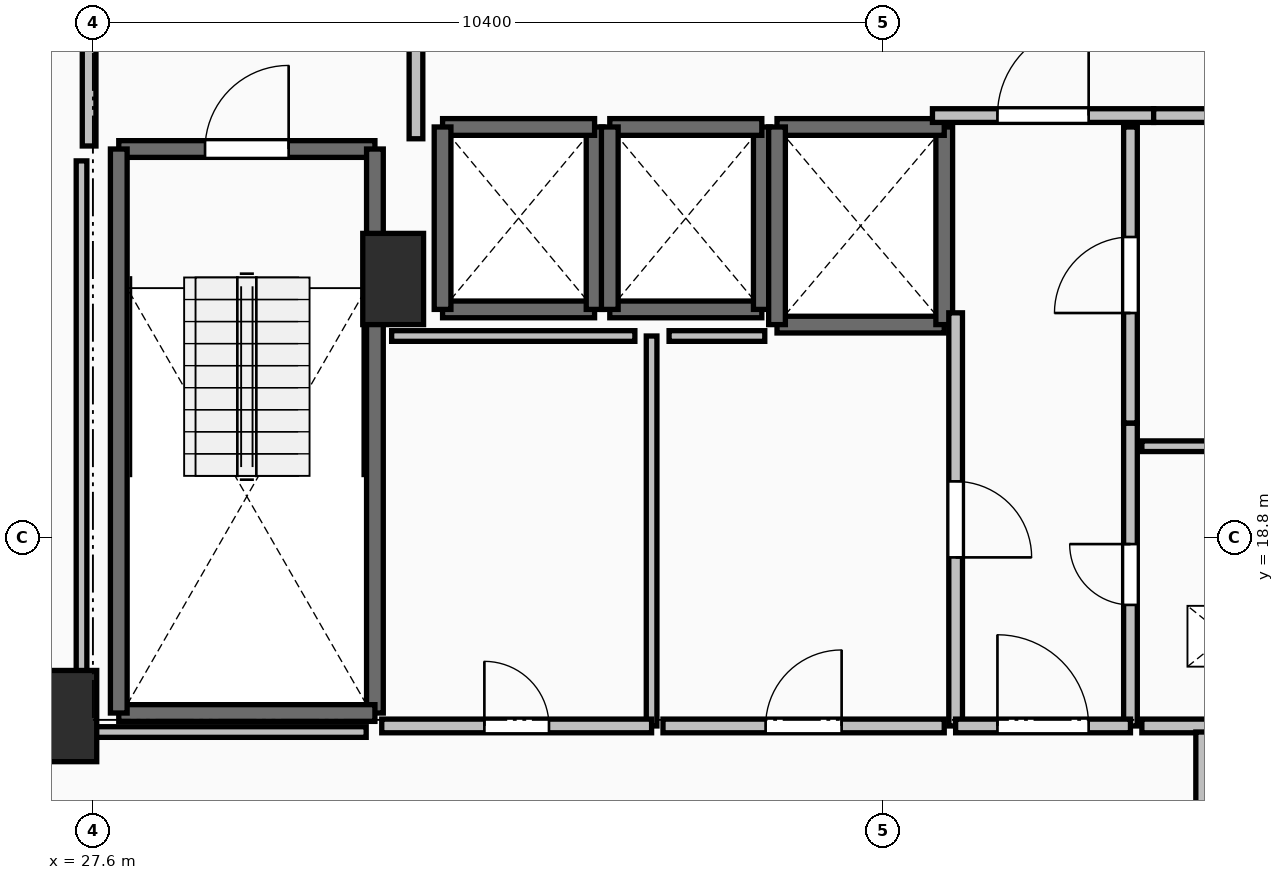
"""IFC4 building model, lengths in metres.
Left out: names, types, materials, properties, quantities, classifications, styles, units other than length and angle.
Written with IfcOpenShell. Run it as: python <this file> out.ifc"""

import sys

from ifc_helpers import new_model, si_unit, direction, frame, frame_2d, origin, origin_2d, place, context, subcontext, project, spatial, rectangle, extrude, element, fill, save


model = new_model("IFC4")
c1 = context("Model", 3, precision=1e-05, world=origin(), true_north=direction((0.0, 1.0)))
c2 = subcontext(c1, "Body", "Model", "MODEL_VIEW")
j1 = project(units=[si_unit("LENGTHUNIT", "METRE"), si_unit("PLANEANGLEUNIT", "RADIAN")], contexts=[c1])
p1 = place(None, origin())
s1 = spatial("IfcSite", under=j1, at=p1, CompositionType="ELEMENT")
p2 = place(p1, origin())
s2 = spatial("IfcBuilding", under=s1, at=p2, CompositionType="ELEMENT")
p3 = place(p2, frame((0.0, 0.0, 99.8)))
s3 = spatial("IfcBuildingStorey", under=s2, at=p3, CompositionType="ELEMENT", Elevation=99.8)
for number, where, z_axis, x_axis in (
    (1, (27.25, 16.45, 0.0), (0.0, 0.0, 1.0), (1.0, 0.0, 0.0)),
    (2, (31.55, 22.2, 0.0), (0.0, 0.0, 1.0), (1.0, 0.0, 0.0)),
):
    element("IfcColumn", number, at=place(p3, frame(where, z_axis=z_axis, x_axis=x_axis)), inside=s3, PredefinedType="PILASTER", context=c2, shape_type="SweptSolid", body=[
        extrude(rectangle(XDim=0.8, YDim=1.2, at=origin_2d()), origin(), (0.0, 0.0, 1.0), 3.5),
    ])
p4 = place(p3, frame((27.94, 23.91, 0.0), z_axis=(0.0, 0.0, 1.0), x_axis=(1.0, 0.0, 0.0)))
e3 = element("IfcWall", 3, at=p4, inside=s3, PredefinedType="SOLIDWALL", context=c2, shape_type="SweptSolid", body=[
    extrude(rectangle(XDim=3.37, YDim=0.22, at=frame_2d((1.685, 0.0))), origin(), (0.0, 0.0, 1.0), 3.24),
])
p5 = place(p4, frame((1.135, 0.0, 0.0)))
e4 = element("IfcOpeningElement", 4, at=p5, cuts=e3, PredefinedType="OPENING", context=c2, shape_type="SweptSolid", body=[
    extrude(rectangle(XDim=1.1, YDim=2.15, at=frame_2d((0.55, 1.075))), frame((0.0, 0.125, 0.0), z_axis=(0.0, -1.0, 0.0), x_axis=(1.0, 0.0, 0.0)), (0.0, 0.0, 1.0), 0.25),
])
p6 = place(p3, frame((31.31, 23.91, 0.0), z_axis=(0.0, 0.0, 1.0), x_axis=(0.0, -1.0, 0.0)))
e5 = element("IfcWall", 5, at=p6, inside=s3, PredefinedType="SOLIDWALL", context=c2, shape_type="SweptSolid", body=[
    extrude(rectangle(XDim=7.42, YDim=0.22, at=frame_2d((3.71, 0.0))), origin(), (0.0, 0.0, 1.0), 3.24),
])
p7 = place(p3, frame((31.31, 16.49, 0.0), z_axis=(0.0, 0.0, 1.0), x_axis=(-1.0, 0.0, 0.0)))
e6 = element("IfcWall", 6, at=p7, inside=s3, PredefinedType="SOLIDWALL", context=c2, shape_type="SweptSolid", body=[
    extrude(rectangle(XDim=3.37, YDim=0.22, at=frame_2d((1.685, 0.0))), origin(), (0.0, 0.0, 1.0), 3.24),
])
p8 = place(p3, frame((27.94, 16.49, 0.0), z_axis=(0.0, 0.0, 1.0), x_axis=(0.0, 1.0, 0.0)))
e7 = element("IfcWall", 7, at=p8, inside=s3, PredefinedType="SOLIDWALL", context=c2, shape_type="SweptSolid", body=[
    extrude(rectangle(XDim=7.42, YDim=0.22, at=frame_2d((3.71, 0.0))), origin(), (0.0, 0.0, 1.0), 3.24),
])
p9 = place(p3, frame((32.2, 21.8, 0.0), z_axis=(0.0, 0.0, 1.0), x_axis=(1.0, 0.0, 0.0)))
e8 = element("IfcWall", 8, at=p9, inside=s3, PredefinedType="SOLIDWALL", context=c2, shape_type="SweptSolid", body=[
    extrude(rectangle(XDim=2.0, YDim=0.22, at=frame_2d((1.0, 0.0))), origin(), (0.0, 0.0, 1.0), 3.24),
])
p10 = place(p3, frame((34.2, 21.8, 0.0), z_axis=(0.0, 0.0, 1.0), x_axis=(0.0, 1.0, 0.0)))
e9 = element("IfcWall", 9, at=p10, inside=s3, PredefinedType="SOLIDWALL", context=c2, shape_type="SweptSolid", body=[
    extrude(rectangle(XDim=2.4, YDim=0.22, at=frame_2d((1.2, 0.0))), origin(), (0.0, 0.0, 1.0), 3.24),
])
p11 = place(p3, frame((34.2, 24.2, 0.0), z_axis=(0.0, 0.0, 1.0), x_axis=(-1.0, 0.0, 0.0)))
e10 = element("IfcWall", 10, at=p11, inside=s3, PredefinedType="SOLIDWALL", context=c2, shape_type="SweptSolid", body=[
    extrude(rectangle(XDim=2.0, YDim=0.22, at=frame_2d((1.0, 0.0))), origin(), (0.0, 0.0, 1.0), 3.24),
])
p12 = place(p3, frame((32.2, 24.2, 0.0), z_axis=(0.0, 0.0, 1.0), x_axis=(0.0, -1.0, 0.0)))
e11 = element("IfcWall", 11, at=p12, inside=s3, PredefinedType="SOLIDWALL", context=c2, shape_type="SweptSolid", body=[
    extrude(rectangle(XDim=2.4, YDim=0.22, at=frame_2d((1.2, 0.0))), origin(), (0.0, 0.0, 1.0), 3.24),
])
p13 = place(p3, frame((34.4, 21.8, 0.0), z_axis=(0.0, 0.0, 1.0), x_axis=(1.0, 0.0, 0.0)))
e12 = element("IfcWall", 12, at=p13, inside=s3, PredefinedType="SOLIDWALL", context=c2, shape_type="SweptSolid", body=[
    extrude(rectangle(XDim=2.0, YDim=0.22, at=frame_2d((1.0, 0.0))), origin(), (0.0, 0.0, 1.0), 3.24),
])
p14 = place(p3, frame((36.4, 21.8, 0.0), z_axis=(0.0, 0.0, 1.0), x_axis=(0.0, 1.0, 0.0)))
e13 = element("IfcWall", 13, at=p14, inside=s3, PredefinedType="SOLIDWALL", context=c2, shape_type="SweptSolid", body=[
    extrude(rectangle(XDim=2.4, YDim=0.22, at=frame_2d((1.2, 0.0))), origin(), (0.0, 0.0, 1.0), 3.24),
])
p15 = place(p3, frame((36.4, 24.2, 0.0), z_axis=(0.0, 0.0, 1.0), x_axis=(-1.0, 0.0, 0.0)))
e14 = element("IfcWall", 14, at=p15, inside=s3, PredefinedType="SOLIDWALL", context=c2, shape_type="SweptSolid", body=[
    extrude(rectangle(XDim=2.0, YDim=0.22, at=frame_2d((1.0, 0.0))), origin(), (0.0, 0.0, 1.0), 3.24),
])
p16 = place(p3, frame((34.4, 24.2, 0.0), z_axis=(0.0, 0.0, 1.0), x_axis=(0.0, -1.0, 0.0)))
e15 = element("IfcWall", 15, at=p16, inside=s3, PredefinedType="SOLIDWALL", context=c2, shape_type="SweptSolid", body=[
    extrude(rectangle(XDim=2.4, YDim=0.22, at=frame_2d((1.2, 0.0))), origin(), (0.0, 0.0, 1.0), 3.24),
])
p17 = place(p3, frame((36.6, 21.6, 0.0), z_axis=(0.0, 0.0, 1.0), x_axis=(1.0, 0.0, 0.0)))
e16 = element("IfcWall", 16, at=p17, inside=s3, PredefinedType="SOLIDWALL", context=c2, shape_type="SweptSolid", body=[
    extrude(rectangle(XDim=2.2, YDim=0.22, at=frame_2d((1.1, 0.0))), origin(), (0.0, 0.0, 1.0), 3.24),
])
p18 = place(p3, frame((38.8, 21.6, 0.0), z_axis=(0.0, 0.0, 1.0), x_axis=(0.0, 1.0, 0.0)))
e17 = element("IfcWall", 17, at=p18, inside=s3, PredefinedType="SOLIDWALL", context=c2, shape_type="SweptSolid", body=[
    extrude(rectangle(XDim=2.6, YDim=0.22, at=frame_2d((1.3, 0.0))), origin(), (0.0, 0.0, 1.0), 3.24),
])
p19 = place(p3, frame((38.8, 24.2, 0.0), z_axis=(0.0, 0.0, 1.0), x_axis=(-1.0, 0.0, 0.0)))
e18 = element("IfcWall", 18, at=p19, inside=s3, PredefinedType="SOLIDWALL", context=c2, shape_type="SweptSolid", body=[
    extrude(rectangle(XDim=2.2, YDim=0.22, at=frame_2d((1.1, 0.0))), origin(), (0.0, 0.0, 1.0), 3.24),
])
p20 = place(p3, frame((36.6, 24.2, 0.0), z_axis=(0.0, 0.0, 1.0), x_axis=(0.0, -1.0, 0.0)))
e19 = element("IfcWall", 19, at=p20, inside=s3, PredefinedType="SOLIDWALL", context=c2, shape_type="SweptSolid", body=[
    extrude(rectangle(XDim=2.6, YDim=0.22, at=frame_2d((1.3, 0.0))), origin(), (0.0, 0.0, 1.0), 3.24),
])
p21 = place(p3, frame((31.85, 24.045, 0.0), z_axis=(0.0, 0.0, 1.0), x_axis=(0.0, 1.0, 0.0)))
e20 = element("IfcWall", 20, at=p21, inside=s3, PredefinedType="PARTITIONING", context=c2, shape_type="SweptSolid", body=[
    extrude(rectangle(XDim=3.91, YDim=0.18, at=frame_2d((1.955, 0.0))), origin(), (0.0, 0.0, 1.0), 3.24),
])
p22 = place(p21, frame((1.355, 0.0, 0.0)))
e21 = element("IfcOpeningElement", 21, at=p22, cuts=e20, PredefinedType="OPENING", context=c2, shape_type="SweptSolid", body=[
    extrude(rectangle(XDim=1.2, YDim=2.15, at=frame_2d((0.6, 1.075))), frame((0.0, 0.105, 0.0), z_axis=(0.0, -1.0, 0.0), x_axis=(1.0, 0.0, 0.0)), (0.0, 0.0, 1.0), 0.21),
])
p23 = place(p3, frame((27.55, 28.0, 0.0), z_axis=(0.0, 0.0, 1.0), x_axis=(0.0, -1.0, 0.0)))
e22 = element("IfcWall", 22, at=p23, inside=s3, PredefinedType="PARTITIONING", context=c2, shape_type="SweptSolid", body=[
    extrude(rectangle(XDim=4.05, YDim=0.18, at=frame_2d((2.025, 0.0))), origin(), (0.0, 0.0, 1.0), 3.24),
])
p24 = place(p23, frame((1.425, 0.0, 0.0)))
e23 = element("IfcOpeningElement", 23, at=p24, cuts=e22, PredefinedType="OPENING", context=c2, shape_type="SweptSolid", body=[
    extrude(rectangle(XDim=1.2, YDim=2.15, at=frame_2d((0.6, 1.075))), frame((0.0, 0.105, 0.0), z_axis=(0.0, -1.0, 0.0), x_axis=(1.0, 0.0, 0.0)), (0.0, 0.0, 1.0), 0.21),
])
p25 = place(p3, frame((38.645, 24.35, 0.0), z_axis=(0.0, 0.0, 1.0), x_axis=(1.0, 0.0, 0.0)))
e24 = element("IfcWall", 24, at=p25, inside=s3, PredefinedType="PARTITIONING", context=c2, shape_type="SweptSolid", body=[
    extrude(rectangle(XDim=2.91, YDim=0.18, at=frame_2d((1.455, 0.0))), origin(), (0.0, 0.0, 1.0), 3.24),
])
p26 = place(p25, frame((0.855, 0.0, 0.0)))
e25 = element("IfcOpeningElement", 25, at=p26, cuts=e24, PredefinedType="OPENING", context=c2, shape_type="SweptSolid", body=[
    extrude(rectangle(XDim=1.2, YDim=2.15, at=frame_2d((0.6, 1.075))), frame((0.0, 0.105, 0.0), z_axis=(0.0, -1.0, 0.0), x_axis=(1.0, 0.0, 0.0)), (0.0, 0.0, 1.0), 0.21),
])
p27 = place(p3, frame((41.555, 24.35, 0.0), z_axis=(0.0, 0.0, 1.0), x_axis=(1.0, 0.0, 0.0)))
e26 = element("IfcWall", 26, at=p27, inside=s3, PredefinedType="PARTITIONING", context=c2, shape_type="SweptSolid", body=[
    extrude(rectangle(XDim=2.445, YDim=0.18, at=frame_2d((1.223, 0.0))), origin(), (0.0, 0.0, 1.0), 3.24),
])
p28 = place(p27, frame((0.722, 0.0, 0.0)))
e27 = element("IfcOpeningElement", 27, at=p28, cuts=e26, PredefinedType="OPENING", context=c2, shape_type="SweptSolid", body=[
    extrude(rectangle(XDim=1.0, YDim=2.15, at=frame_2d((0.5, 1.075))), frame((0.0, 0.105, 0.0), z_axis=(0.0, -1.0, 0.0), x_axis=(1.0, 0.0, 0.0)), (0.0, 0.0, 1.0), 0.21),
])
p29 = place(p3, frame((41.25, 16.32, 0.0), z_axis=(0.0, 0.0, 1.0), x_axis=(0.0, 1.0, 0.0)))
e28 = element("IfcWall", 28, at=p29, inside=s3, PredefinedType="PARTITIONING", context=c2, shape_type="SweptSolid", body=[
    extrude(rectangle(XDim=3.985, YDim=0.18, at=frame_2d((1.992, 0.0))), origin(), (0.0, 0.0, 1.0), 3.24),
])
p30 = place(p29, frame((1.593, 0.0, 0.0)))
e29 = element("IfcOpeningElement", 29, at=p30, cuts=e28, PredefinedType="OPENING", context=c2, shape_type="SweptSolid", body=[
    extrude(rectangle(XDim=0.8, YDim=2.05, at=frame_2d((0.4, 1.025))), frame((0.0, 0.105, 0.0), z_axis=(0.0, -1.0, 0.0), x_axis=(1.0, 0.0, 0.0)), (0.0, 0.0, 1.0), 0.21),
])
p31 = place(p3, frame((41.25, 20.305, 0.0), z_axis=(0.0, 0.0, 1.0), x_axis=(0.0, 1.0, 0.0)))
e30 = element("IfcWall", 30, at=p31, inside=s3, PredefinedType="PARTITIONING", context=c2, shape_type="SweptSolid", body=[
    extrude(rectangle(XDim=3.895, YDim=0.18, at=frame_2d((1.948, 0.0))), origin(), (0.0, 0.0, 1.0), 3.24),
])
p32 = place(p31, frame((1.448, 0.0, 0.0)))
e31 = element("IfcOpeningElement", 31, at=p32, cuts=e30, PredefinedType="OPENING", context=c2, shape_type="SweptSolid", body=[
    extrude(rectangle(XDim=1.0, YDim=2.15, at=frame_2d((0.5, 1.075))), frame((0.0, 0.105, 0.0), z_axis=(0.0, -1.0, 0.0), x_axis=(1.0, 0.0, 0.0)), (0.0, 0.0, 1.0), 0.21),
])
p33 = place(p3, frame((38.95, 21.755, 0.0), z_axis=(0.0, 0.0, 1.0), x_axis=(0.0, -1.0, 0.0)))
e32 = element("IfcWall", 32, at=p33, inside=s3, PredefinedType="PARTITIONING", context=c2, shape_type="SweptSolid", body=[
    extrude(rectangle(XDim=5.435, YDim=0.18, at=frame_2d((2.717, 0.0))), origin(), (0.0, 0.0, 1.0), 3.24),
])
p34 = place(p33, frame((2.218, 0.0, 0.0)))
e33 = element("IfcOpeningElement", 33, at=p34, cuts=e32, PredefinedType="OPENING", context=c2, shape_type="SweptSolid", body=[
    extrude(rectangle(XDim=1.0, YDim=2.15, at=frame_2d((0.5, 1.075))), frame((0.0, 0.105, 0.0), z_axis=(0.0, -1.0, 0.0), x_axis=(1.0, 0.0, 0.0)), (0.0, 0.0, 1.0), 0.21),
])
p35 = place(p3, frame((38.95, 16.32, 0.0), z_axis=(0.0, 0.0, 1.0), x_axis=(1.0, 0.0, 0.0)))
e34 = element("IfcWall", 34, at=p35, inside=s3, PredefinedType="PARTITIONING", context=c2, shape_type="SweptSolid", body=[
    extrude(rectangle(XDim=2.3, YDim=0.18, at=frame_2d((1.15, 0.0))), origin(), (0.0, 0.0, 1.0), 3.24),
])
p36 = place(p35, frame((0.55, 0.0, 0.0)))
e35 = element("IfcOpeningElement", 35, at=p36, cuts=e34, PredefinedType="OPENING", context=c2, shape_type="SweptSolid", body=[
    extrude(rectangle(XDim=1.2, YDim=2.15, at=frame_2d((0.6, 1.075))), frame((0.0, 0.105, 0.0), z_axis=(0.0, -1.0, 0.0), x_axis=(1.0, 0.0, 0.0)), (0.0, 0.0, 1.0), 0.21),
])
p37 = place(p3, frame((44.6, 20.0, 0.0), z_axis=(0.0, 0.0, 1.0), x_axis=(-1.0, 0.0, 0.0)))
e36 = element("IfcWall", 36, at=p37, inside=s3, PredefinedType="PARTITIONING", context=c2, shape_type="SweptSolid", body=[
    extrude(rectangle(XDim=3.2, YDim=0.14, at=frame_2d((1.6, 0.0))), origin(), (0.0, 0.0, 1.0), 3.24),
])
p38 = place(p3, frame((41.4, 16.32, 0.0), z_axis=(0.0, 0.0, 1.0), x_axis=(1.0, 0.0, 0.0)))
e37 = element("IfcWall", 37, at=p38, inside=s3, PredefinedType="PARTITIONING", context=c2, shape_type="SweptSolid", body=[
    extrude(rectangle(XDim=3.2, YDim=0.18, at=frame_2d((1.6, 0.0))), origin(), (0.0, 0.0, 1.0), 3.24),
])
p39 = place(p38, frame((1.2, 0.0, 0.0)))
e38 = element("IfcOpeningElement", 38, at=p39, cuts=e37, PredefinedType="OPENING", context=c2, shape_type="SweptSolid", body=[
    extrude(rectangle(XDim=0.8, YDim=2.05, at=frame_2d((0.4, 1.025))), frame((0.0, 0.105, 0.0), z_axis=(0.0, -1.0, 0.0), x_axis=(1.0, 0.0, 0.0)), (0.0, 0.0, 1.0), 0.21),
])
p40 = place(p3, frame((34.95, 16.32, 0.0), z_axis=(0.0, 0.0, 1.0), x_axis=(0.0, 1.0, 0.0)))
e39 = element("IfcWall", 39, at=p40, inside=s3, PredefinedType="PARTITIONING", context=c2, shape_type="SweptSolid", body=[
    extrude(rectangle(XDim=5.13, YDim=0.14, at=frame_2d((2.565, 0.0))), origin(), (0.0, 0.0, 1.0), 3.24),
])
p41 = place(p3, frame((31.4, 16.32, 0.0), z_axis=(0.0, 0.0, 1.0), x_axis=(1.0, 0.0, 0.0)))
e40 = element("IfcWall", 40, at=p41, inside=s3, PredefinedType="PARTITIONING", context=c2, shape_type="SweptSolid", body=[
    extrude(rectangle(XDim=3.55, YDim=0.18, at=frame_2d((1.775, 0.0))), origin(), (0.0, 0.0, 1.0), 3.24),
])
p42 = place(p41, frame((1.35, 0.0, 0.0)))
e41 = element("IfcOpeningElement", 41, at=p42, cuts=e40, PredefinedType="OPENING", context=c2, shape_type="SweptSolid", body=[
    extrude(rectangle(XDim=0.85, YDim=2.1, at=frame_2d((0.425, 1.05))), frame((0.0, 0.105, 0.0), z_axis=(0.0, -1.0, 0.0), x_axis=(1.0, 0.0, 0.0)), (0.0, 0.0, 1.0), 0.21),
])
p43 = place(p3, frame((35.1, 16.32, 0.0), z_axis=(0.0, 0.0, 1.0), x_axis=(1.0, 0.0, 0.0)))
e42 = element("IfcWall", 42, at=p43, inside=s3, PredefinedType="PARTITIONING", context=c2, shape_type="SweptSolid", body=[
    extrude(rectangle(XDim=3.7, YDim=0.18, at=frame_2d((1.85, 0.0))), origin(), (0.0, 0.0, 1.0), 3.24),
])
p44 = place(p43, frame((1.35, 0.0, 0.0)))
e43 = element("IfcOpeningElement", 43, at=p44, cuts=e42, PredefinedType="OPENING", context=c2, shape_type="SweptSolid", body=[
    extrude(rectangle(XDim=1.0, YDim=2.15, at=frame_2d((0.5, 1.075))), frame((0.0, 0.105, 0.0), z_axis=(0.0, -1.0, 0.0), x_axis=(1.0, 0.0, 0.0)), (0.0, 0.0, 1.0), 0.21),
])
p45 = place(p3, frame((42.2, 14.1, 0.0), z_axis=(0.0, 0.0, 1.0), x_axis=(0.0, 1.0, 0.0)))
e44 = element("IfcWall", 44, at=p45, inside=s3, PredefinedType="PARTITIONING", context=c2, shape_type="SweptSolid", body=[
    extrude(rectangle(XDim=2.14, YDim=0.18, at=frame_2d((1.07, 0.0))), origin(), (0.0, 0.0, 1.0), 3.24),
])
p46 = place(p3, frame((34.73, 21.45, 0.0), z_axis=(0.0, 0.0, 1.0), x_axis=(-1.0, 0.0, 0.0)))
e45 = element("IfcWall", 45, at=p46, inside=s3, PredefinedType="PARTITIONING", context=c2, shape_type="SweptSolid", body=[
    extrude(rectangle(XDim=3.2, YDim=0.14, at=frame_2d((1.6, 0.0))), origin(), (0.0, 0.0, 1.0), 3.24),
])
p47 = place(p3, frame((36.439, 21.45, 0.0), z_axis=(0.0, 0.0, 1.0), x_axis=(-1.0, 0.0, 0.0)))
e46 = element("IfcWall", 46, at=p47, inside=s3, PredefinedType="PARTITIONING", context=c2, shape_type="SweptSolid", body=[
    extrude(rectangle(XDim=1.259, YDim=0.14, at=frame_2d((0.629, 0.0))), origin(), (0.0, 0.0, 1.0), 3.24),
])
p48 = place(p3, frame((31.195, 16.24, 0.0), z_axis=(0.0, 0.0, 1.0), x_axis=(-1.0, 0.0, 0.0)))
e47 = element("IfcWall", 47, at=p48, inside=s3, PredefinedType="PARTITIONING", context=c2, shape_type="SweptSolid", body=[
    extrude(rectangle(XDim=3.745, YDim=0.14, at=frame_2d((1.873, 0.0))), origin(), (0.0, 0.0, 1.0), 2.432),
])
p49 = place(p3, frame((27.45, 16.24, 0.0), z_axis=(0.0, 0.0, 1.0), x_axis=(0.0, 1.0, 0.0)))
e48 = element("IfcWall", 48, at=p49, inside=s3, PredefinedType="PARTITIONING", context=c2, shape_type="SweptSolid", body=[
    extrude(rectangle(XDim=7.514, YDim=0.14, at=frame_2d((3.757, 0.0))), origin(), (0.0, 0.0, 1.0), 2.432),
])
p50 = place(p5, origin())
e49 = element("IfcDoor", 49, at=p50, inside=s3, OperationType="SINGLE_SWING_RIGHT", PredefinedType="DOOR", context=c2, shape_type="SweptSolid", body=[
    extrude(rectangle(XDim=1.1, YDim=2.15, at=frame_2d((0.55, 1.075))), frame((0.0, 0.025, 0.0), z_axis=(0.0, -1.0, 0.0), x_axis=(1.0, 0.0, 0.0)), (0.0, 0.0, 1.0), 0.05),
])
fill(e4, e49)
p51 = place(p26, origin())
e50 = element("IfcDoor", 50, at=p51, inside=s3, OperationType="SINGLE_SWING_RIGHT", PredefinedType="DOOR", context=c2, shape_type="SweptSolid", body=[
    extrude(rectangle(XDim=1.2, YDim=2.15, at=frame_2d((0.6, 1.075))), frame((0.0, 0.025, 0.0), z_axis=(0.0, -1.0, 0.0), x_axis=(1.0, 0.0, 0.0)), (0.0, 0.0, 1.0), 0.05),
])
fill(e25, e50)
p52 = place(p30, origin())
e51 = element("IfcDoor", 51, at=p52, inside=s3, OperationType="SINGLE_SWING_RIGHT", PredefinedType="DOOR", context=c2, shape_type="SweptSolid", body=[
    extrude(rectangle(XDim=0.8, YDim=2.05, at=frame_2d((0.4, 1.025))), frame((0.0, 0.025, 0.0), z_axis=(0.0, -1.0, 0.0), x_axis=(1.0, 0.0, 0.0)), (0.0, 0.0, 1.0), 0.05),
])
fill(e29, e51)
p53 = place(p32, origin())
e52 = element("IfcDoor", 52, at=p53, inside=s3, OperationType="SINGLE_SWING_LEFT", PredefinedType="DOOR", context=c2, shape_type="SweptSolid", body=[
    extrude(rectangle(XDim=1.0, YDim=2.15, at=frame_2d((0.5, 1.075))), frame((0.0, 0.025, 0.0), z_axis=(0.0, -1.0, 0.0), x_axis=(1.0, 0.0, 0.0)), (0.0, 0.0, 1.0), 0.05),
])
fill(e31, e52)
p54 = place(p34, origin())
e53 = element("IfcDoor", 53, at=p54, inside=s3, OperationType="SINGLE_SWING_RIGHT", PredefinedType="DOOR", context=c2, shape_type="SweptSolid", body=[
    extrude(rectangle(XDim=1.0, YDim=2.15, at=frame_2d((0.5, 1.075))), frame((0.0, 0.025, 0.0), z_axis=(0.0, -1.0, 0.0), x_axis=(1.0, 0.0, 0.0)), (0.0, 0.0, 1.0), 0.05),
])
fill(e33, e53)
p55 = place(p36, origin())
e54 = element("IfcDoor", 54, at=p55, inside=s3, OperationType="SINGLE_SWING_LEFT", PredefinedType="DOOR", context=c2, shape_type="SweptSolid", body=[
    extrude(rectangle(XDim=1.2, YDim=2.15, at=frame_2d((0.6, 1.075))), frame((0.0, 0.025, 0.0), z_axis=(0.0, -1.0, 0.0), x_axis=(1.0, 0.0, 0.0)), (0.0, 0.0, 1.0), 0.05),
])
fill(e35, e54)
p56 = place(p42, origin())
e55 = element("IfcDoor", 55, at=p56, inside=s3, OperationType="SINGLE_SWING_LEFT", PredefinedType="DOOR", context=c2, shape_type="SweptSolid", body=[
    extrude(rectangle(XDim=0.85, YDim=2.1, at=frame_2d((0.425, 1.05))), frame((0.0, 0.025, 0.0), z_axis=(0.0, -1.0, 0.0), x_axis=(1.0, 0.0, 0.0)), (0.0, 0.0, 1.0), 0.05),
])
fill(e41, e55)
p57 = place(p44, origin())
e56 = element("IfcDoor", 56, at=p57, inside=s3, OperationType="SINGLE_SWING_RIGHT", PredefinedType="DOOR", context=c2, shape_type="SweptSolid", body=[
    extrude(rectangle(XDim=1.0, YDim=2.15, at=frame_2d((0.5, 1.075))), frame((0.0, 0.025, 0.0), z_axis=(0.0, -1.0, 0.0), x_axis=(1.0, 0.0, 0.0)), (0.0, 0.0, 1.0), 0.05),
])
fill(e43, e56)
save(model, sys.argv[1])
